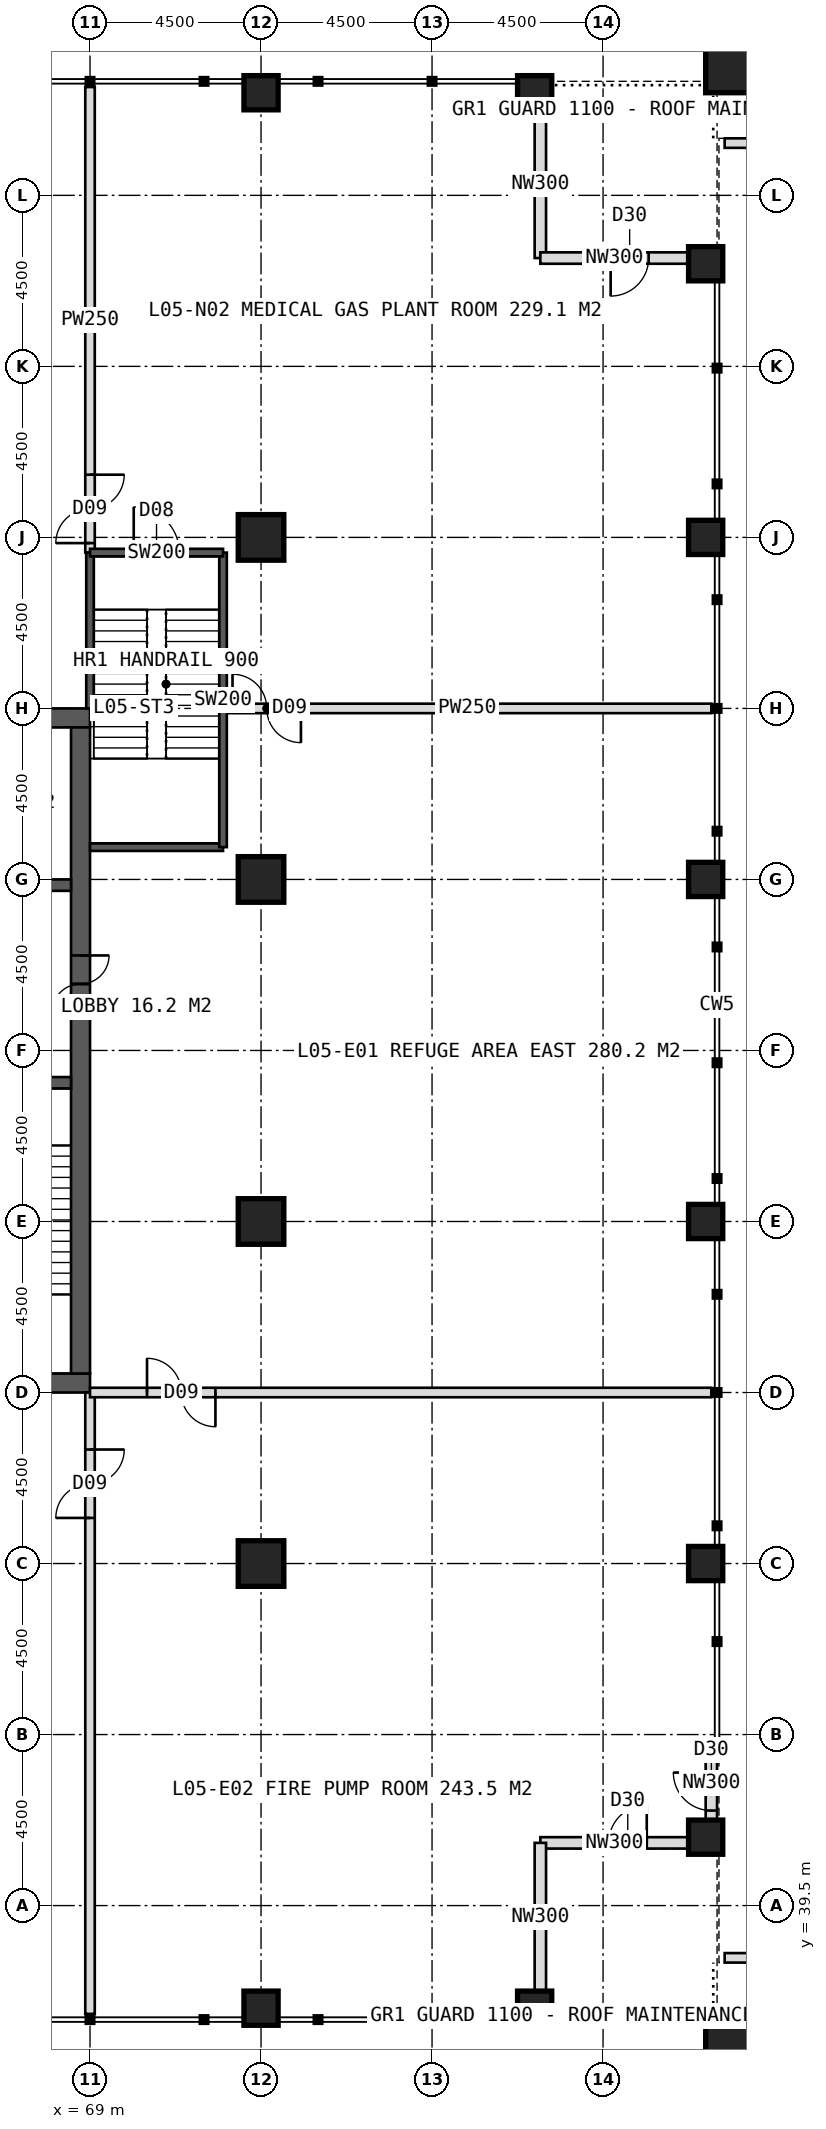
"""IFC4 building model, lengths in metres.
Left out: names, types, materials, properties, quantities, classifications, styles, units other than length and angle.
Written with IfcOpenShell. Run it as: python <this file> out.ifc"""

import sys

from ifc_helpers import new_model, si_unit, direction, frame, frame_2d, origin, origin_2d, place, context, subcontext, project, spatial, rectangle, hollow_rectangle, extrude, element, fill, save


model = new_model("IFC4")
c1 = context("Model", 3, precision=1e-05, world=origin(), true_north=direction((0.0, 1.0)))
c2 = subcontext(c1, "Body", "Model", "MODEL_VIEW")
j1 = project(units=[si_unit("LENGTHUNIT", "METRE"), si_unit("PLANEANGLEUNIT", "RADIAN")], contexts=[c1])
p1 = place(None, origin())
s1 = spatial("IfcSite", under=j1, at=p1, CompositionType="ELEMENT")
p2 = place(p1, origin())
s2 = spatial("IfcBuilding", under=s1, at=p2, CompositionType="ELEMENT")
p3 = place(p2, frame((0.0, 0.0, 26.0)))
s3 = spatial("IfcBuildingStorey", under=s2, at=p3, CompositionType="ELEMENT", Elevation=26.0)
p4 = place(p3, frame((51.0, 70.75, 0.0), z_axis=(0.0, 0.0, 1.0), x_axis=(1.0, 0.0, 0.0)))
e1 = element("IfcWall", 1, at=p4, inside=s3, PredefinedType="SHEAR", context=c2, shape_type="SweptSolid", body=[
    extrude(rectangle(XDim=18.0, YDim=0.5, at=frame_2d((9.0, 0.0))), origin(), (0.0, 0.0, 1.0), 5.0),
])
p5 = place(p4, frame((8.1, 0.0, 0.0)))
e2 = element("IfcOpeningElement", 2, at=p5, cuts=e1, PredefinedType="OPENING", context=c2, shape_type="SweptSolid", body=[
    extrude(rectangle(XDim=1.8, YDim=2.2, at=frame_2d((0.9, 1.1))), frame((0.0, 0.26, 0.0), z_axis=(0.0, -1.0, 0.0), x_axis=(1.0, 0.0, 0.0)), (0.0, 0.0, 1.0), 0.52),
])
p6 = place(p3, frame((51.0, 53.25, 0.0), z_axis=(0.0, 0.0, 1.0), x_axis=(1.0, 0.0, 0.0)))
e3 = element("IfcWall", 3, at=p6, inside=s3, PredefinedType="SHEAR", context=c2, shape_type="SweptSolid", body=[
    extrude(rectangle(XDim=18.0, YDim=0.5, at=frame_2d((9.0, 0.0))), origin(), (0.0, 0.0, 1.0), 5.0),
])
p7 = place(p6, frame((8.1, 0.0, 0.0)))
e4 = element("IfcOpeningElement", 4, at=p7, cuts=e3, PredefinedType="OPENING", context=c2, shape_type="SweptSolid", body=[
    extrude(rectangle(XDim=1.8, YDim=2.2, at=frame_2d((0.9, 1.1))), frame((0.0, 0.26, 0.0), z_axis=(0.0, -1.0, 0.0), x_axis=(1.0, 0.0, 0.0)), (0.0, 0.0, 1.0), 0.52),
])
p8 = place(p3, frame((68.75, 53.5, 0.0), z_axis=(0.0, 0.0, 1.0), x_axis=(0.0, 1.0, 0.0)))
e5 = element("IfcWall", 5, at=p8, inside=s3, PredefinedType="SHEAR", context=c2, shape_type="SweptSolid", body=[
    extrude(rectangle(XDim=17.0, YDim=0.5, at=frame_2d((8.5, 0.0))), origin(), (0.0, 0.0, 1.0), 5.0),
])
p9 = place(p8, frame((9.5, 0.0, 0.0)))
e6 = element("IfcOpeningElement", 6, at=p9, cuts=e5, PredefinedType="OPENING", context=c2, shape_type="SweptSolid", body=[
    extrude(rectangle(XDim=1.5, YDim=2.2, at=frame_2d((0.75, 1.1))), frame((0.0, 0.26, 0.0), z_axis=(0.0, -1.0, 0.0), x_axis=(1.0, 0.0, 0.0)), (0.0, 0.0, 1.0), 0.52),
])
p10 = place(p3, frame((65.2, 61.15, 0.0), z_axis=(0.0, 0.0, 1.0), x_axis=(1.0, 0.0, 0.0)))
e7 = element("IfcWall", 7, at=p10, inside=s3, PredefinedType="SHEAR", context=c2, shape_type="SweptSolid", body=[
    extrude(rectangle(XDim=3.3, YDim=0.3, at=frame_2d((1.65, 0.0))), origin(), (0.0, 0.0, 1.0), 5.0),
])
p11 = place(p10, frame((1.05, 0.0, 0.0)))
e8 = element("IfcOpeningElement", 8, at=p11, cuts=e7, PredefinedType="OPENING", context=c2, shape_type="SweptSolid", body=[
    extrude(rectangle(XDim=1.2, YDim=2.1, at=frame_2d((0.6, 1.05))), frame((0.0, 0.16, 0.0), z_axis=(0.0, -1.0, 0.0), x_axis=(1.0, 0.0, 0.0)), (0.0, 0.0, 1.0), 0.32),
])
p12 = place(p3, frame((65.2, 66.35, 0.0), z_axis=(0.0, 0.0, 1.0), x_axis=(1.0, 0.0, 0.0)))
e9 = element("IfcWall", 9, at=p12, inside=s3, PredefinedType="SHEAR", context=c2, shape_type="SweptSolid", body=[
    extrude(rectangle(XDim=3.3, YDim=0.3, at=frame_2d((1.65, 0.0))), origin(), (0.0, 0.0, 1.0), 5.0),
])
p13 = place(p12, frame((1.05, 0.0, 0.0)))
e10 = element("IfcOpeningElement", 10, at=p13, cuts=e9, PredefinedType="OPENING", context=c2, shape_type="SweptSolid", body=[
    extrude(rectangle(XDim=1.2, YDim=2.2, at=frame_2d((0.6, 1.1))), frame((0.0, 0.16, 0.0), z_axis=(0.0, -1.0, 0.0), x_axis=(1.0, 0.0, 0.0)), (0.0, 0.0, 1.0), 0.32),
])
for number, where, z_axis, x_axis in (
    (11, (73.5, 48.5, 0.0), (0.0, 0.0, 1.0), (1.0, 0.0, 0.0)),
    (12, (73.5, 75.5, 0.0), (0.0, 0.0, 1.0), (1.0, 0.0, 0.0)),
    (13, (73.5, 57.5, 0.0), (0.0, 0.0, 1.0), (1.0, 0.0, 0.0)),
    (14, (73.5, 66.5, 0.0), (0.0, 0.0, 1.0), (1.0, 0.0, 0.0)),
):
    element("IfcColumn", number, at=place(p3, frame(where, z_axis=z_axis, x_axis=x_axis)), inside=s3, PredefinedType="COLUMN", context=c2, shape_type="SweptSolid", body=[
        extrude(hollow_rectangle(XDim=1.2, YDim=1.2, WallThickness=0.1, at=origin_2d()), origin(), (0.0, 0.0, 1.0), 5.0),
    ])
for number, where, z_axis, x_axis in (
    (15, (85.2, 41.3, 0.0), (0.0, 0.0, 1.0), (1.0, 0.0, 0.0)),
    (16, (85.2, 48.5, 0.0), (0.0, 0.0, 1.0), (1.0, 0.0, 0.0)),
    (17, (85.2, 57.5, 0.0), (0.0, 0.0, 1.0), (1.0, 0.0, 0.0)),
    (18, (85.2, 66.5, 0.0), (0.0, 0.0, 1.0), (1.0, 0.0, 0.0)),
    (19, (73.5, 36.8, 0.0), (0.0, 0.0, 1.0), (1.0, 0.0, 0.0)),
    (20, (73.5, 87.2, 0.0), (0.0, 0.0, 1.0), (1.0, 0.0, 0.0)),
    (21, (85.2, 75.5, 0.0), (0.0, 0.0, 1.0), (1.0, 0.0, 0.0)),
    (22, (80.7, 36.8, 0.0), (0.0, 0.0, 1.0), (1.0, 0.0, 0.0)),
    (23, (80.7, 87.2, 0.0), (0.0, 0.0, 1.0), (1.0, 0.0, 0.0)),
    (24, (85.2, 82.7, 0.0), (0.0, 0.0, 1.0), (1.0, 0.0, 0.0)),
):
    element("IfcColumn", number, at=place(p3, frame(where, z_axis=z_axis, x_axis=x_axis)), inside=s3, PredefinedType="COLUMN", context=c2, shape_type="SweptSolid", body=[
        extrude(hollow_rectangle(XDim=0.9, YDim=0.9, WallThickness=0.08, at=origin_2d()), origin(), (0.0, 0.0, 1.0), 5.0),
    ])
for number, where, z_axis, x_axis in (
    (25, (86.1, 35.9, 0.0), (0.0, 0.0, 1.0), (1.0, 0.0, 0.0)),
    (26, (86.1, 88.1, 0.0), (0.0, 0.0, 1.0), (1.0, 0.0, 0.0)),
):
    element("IfcColumn", number, at=place(p3, frame(where, z_axis=z_axis, x_axis=x_axis)), inside=s3, PredefinedType="COLUMN", context=c2, shape_type="SweptSolid", body=[
        extrude(hollow_rectangle(XDim=1.8, YDim=1.8, WallThickness=0.1, at=origin_2d()), origin(), (0.0, 0.0, 1.0), 5.0),
    ])
p14 = place(p3, frame((85.35, 43.7, 0.0), z_axis=(0.0, 0.0, 1.0), x_axis=(0.0, -1.0, 0.0)))
e27 = element("IfcWall", 27, at=p14, inside=s3, PredefinedType="ELEMENTEDWALL", context=c2, shape_type="SweptSolid", body=[
    extrude(rectangle(XDim=1.95, YDim=0.3, at=frame_2d((0.975, 0.0))), origin(), (0.0, 0.0, 1.0), 4.25),
])
p15 = place(p14, frame((0.7, 0.0, 0.0)))
e28 = element("IfcOpeningElement", 28, at=p15, cuts=e27, PredefinedType="OPENING", context=c2, shape_type="SweptSolid", body=[
    extrude(rectangle(XDim=1.0, YDim=2.1, at=frame_2d((0.5, 1.05))), frame((0.0, 0.16, 0.0), z_axis=(0.0, -1.0, 0.0), x_axis=(1.0, 0.0, 0.0)), (0.0, 0.0, 1.0), 0.32),
])
p16 = place(p3, frame((80.85, 86.75, 0.0), z_axis=(0.0, 0.0, 1.0), x_axis=(0.0, -1.0, 0.0)))
e29 = element("IfcWall", 29, at=p16, inside=s3, PredefinedType="ELEMENTEDWALL", context=c2, shape_type="SweptSolid", body=[
    extrude(rectangle(XDim=3.9, YDim=0.3, at=frame_2d((1.95, 0.0))), origin(), (0.0, 0.0, 1.0), 3.95),
])
p17 = place(p3, frame((80.85, 82.85, 0.0), z_axis=(0.0, 0.0, 1.0), x_axis=(1.0, 0.0, 0.0)))
e30 = element("IfcWall", 30, at=p17, inside=s3, PredefinedType="ELEMENTEDWALL", context=c2, shape_type="SweptSolid", body=[
    extrude(rectangle(XDim=3.9, YDim=0.3, at=frame_2d((1.95, 0.0))), origin(), (0.0, 0.0, 1.0), 3.95),
])
p18 = place(p17, frame((1.85, 0.0, 0.0)))
e31 = element("IfcOpeningElement", 31, at=p18, cuts=e30, PredefinedType="OPENING", context=c2, shape_type="SweptSolid", body=[
    extrude(rectangle(XDim=1.0, YDim=2.1, at=frame_2d((0.5, 1.05))), frame((0.0, 0.16, 0.0), z_axis=(0.0, -1.0, 0.0), x_axis=(1.0, 0.0, 0.0)), (0.0, 0.0, 1.0), 0.32),
])
p19 = place(p3, frame((84.75, 41.15, 0.0), z_axis=(0.0, 0.0, 1.0), x_axis=(-1.0, 0.0, 0.0)))
e32 = element("IfcWall", 32, at=p19, inside=s3, PredefinedType="ELEMENTEDWALL", context=c2, shape_type="SweptSolid", body=[
    extrude(rectangle(XDim=3.9, YDim=0.3, at=frame_2d((1.95, 0.0))), origin(), (0.0, 0.0, 1.0), 3.95),
])
p20 = place(p19, frame((1.1, 0.0, 0.0)))
e33 = element("IfcOpeningElement", 33, at=p20, cuts=e32, PredefinedType="OPENING", context=c2, shape_type="SweptSolid", body=[
    extrude(rectangle(XDim=1.0, YDim=2.1, at=frame_2d((0.5, 1.05))), frame((0.0, 0.16, 0.0), z_axis=(0.0, -1.0, 0.0), x_axis=(1.0, 0.0, 0.0)), (0.0, 0.0, 1.0), 0.32),
])
p21 = place(p3, frame((80.85, 41.15, 0.0), z_axis=(0.0, 0.0, 1.0), x_axis=(0.0, -1.0, 0.0)))
e34 = element("IfcWall", 34, at=p21, inside=s3, PredefinedType="ELEMENTEDWALL", context=c2, shape_type="SweptSolid", body=[
    extrude(rectangle(XDim=3.9, YDim=0.3, at=frame_2d((1.95, 0.0))), origin(), (0.0, 0.0, 1.0), 3.95),
])
for number, where, z_axis, x_axis in (
    (35, (85.7, 38.125, 0.0), (0.0, 0.0, 1.0), (1.0, 0.0, 0.0)),
    (36, (85.7, 85.875, 0.0), (0.0, 0.0, 1.0), (1.0, 0.0, 0.0)),
):
    element("IfcWall", number, at=place(p3, frame(where, z_axis=z_axis, x_axis=x_axis)), inside=s3, PredefinedType="PARAPET", context=c2, shape_type="SweptSolid", body=[
        extrude(rectangle(XDim=22.175, YDim=0.25, at=frame_2d((11.087, 0.0))), origin(), (0.0, 0.0, 1.0), 1.1),
    ])
p22 = place(p3, frame((69.0, 75.1, 0.0), z_axis=(0.0, 0.0, 1.0), x_axis=(0.0, 1.0, 0.0)))
e37 = element("IfcWall", 37, at=p22, inside=s3, PredefinedType="SOLIDWALL", context=c2, shape_type="SweptSolid", body=[
    extrude(rectangle(XDim=12.25, YDim=0.25, at=frame_2d((6.125, 0.0))), origin(), (0.0, 0.0, 1.0), 4.75),
])
p23 = place(p22, frame((0.25, 0.0, 0.0)))
e38 = element("IfcOpeningElement", 38, at=p23, cuts=e37, PredefinedType="OPENING", context=c2, shape_type="SweptSolid", body=[
    extrude(rectangle(XDim=1.8, YDim=2.2, at=frame_2d((0.9, 1.1))), frame((0.0, 0.135, 0.0), z_axis=(0.0, -1.0, 0.0), x_axis=(1.0, 0.0, 0.0)), (0.0, 0.0, 1.0), 0.27),
])
p24 = place(p3, frame((69.0, 53.0, 0.0), z_axis=(0.0, 0.0, 1.0), x_axis=(0.0, -1.0, 0.0)))
e39 = element("IfcWall", 39, at=p24, inside=s3, PredefinedType="SOLIDWALL", context=c2, shape_type="SweptSolid", body=[
    extrude(rectangle(XDim=16.35, YDim=0.25, at=frame_2d((8.175, 0.0))), origin(), (0.0, 0.0, 1.0), 4.75),
])
p25 = place(p24, frame((1.5, 0.0, 0.0)))
e40 = element("IfcOpeningElement", 40, at=p25, cuts=e39, PredefinedType="OPENING", context=c2, shape_type="SweptSolid", body=[
    extrude(rectangle(XDim=1.8, YDim=2.2, at=frame_2d((0.9, 1.1))), frame((0.0, 0.135, 0.0), z_axis=(0.0, -1.0, 0.0), x_axis=(1.0, 0.0, 0.0)), (0.0, 0.0, 1.0), 0.27),
])
p26 = place(p3, frame((69.0, 53.0, 0.0), z_axis=(0.0, 0.0, 1.0), x_axis=(1.0, 0.0, 0.0)))
e41 = element("IfcWall", 41, at=p26, inside=s3, PredefinedType="SOLIDWALL", context=c2, shape_type="SweptSolid", body=[
    extrude(rectangle(XDim=16.35, YDim=0.25, at=frame_2d((8.175, 0.0))), origin(), (0.0, 0.0, 1.0), 4.75),
])
p27 = place(p26, frame((1.5, 0.0, 0.0)))
e42 = element("IfcOpeningElement", 42, at=p27, cuts=e41, PredefinedType="OPENING", context=c2, shape_type="SweptSolid", body=[
    extrude(rectangle(XDim=1.8, YDim=2.2, at=frame_2d((0.9, 1.1))), frame((0.0, 0.135, 0.0), z_axis=(0.0, -1.0, 0.0), x_axis=(1.0, 0.0, 0.0)), (0.0, 0.0, 1.0), 0.27),
])
p28 = place(p3, frame((72.5, 71.0, 0.0), z_axis=(0.0, 0.0, 1.0), x_axis=(1.0, 0.0, 0.0)))
e43 = element("IfcWall", 43, at=p28, inside=s3, PredefinedType="SOLIDWALL", context=c2, shape_type="SweptSolid", body=[
    extrude(rectangle(XDim=12.85, YDim=0.25, at=frame_2d((6.425, 0.0))), origin(), (0.0, 0.0, 1.0), 4.75),
])
p29 = place(p28, frame((0.25, 0.0, 0.0)))
e44 = element("IfcOpeningElement", 44, at=p29, cuts=e43, PredefinedType="OPENING", context=c2, shape_type="SweptSolid", body=[
    extrude(rectangle(XDim=1.8, YDim=2.2, at=frame_2d((0.9, 1.1))), frame((0.0, 0.135, 0.0), z_axis=(0.0, -1.0, 0.0), x_axis=(1.0, 0.0, 0.0)), (0.0, 0.0, 1.0), 0.27),
])
p30 = place(p3, frame((69.0, 71.0, 0.0), z_axis=(0.0, 0.0, 1.0), x_axis=(0.0, 1.0, 0.0)))
e45 = element("IfcWall", 45, at=p30, inside=s3, PredefinedType="SOLIDWALL", context=c2, shape_type="SweptSolid", body=[
    extrude(rectangle(XDim=4.1, YDim=0.2, at=frame_2d((2.05, 0.0))), origin(), (0.0, 0.0, 1.0), 4.75),
])
p31 = place(p3, frame((69.0, 67.35, 0.0), z_axis=(0.0, 0.0, 1.0), x_axis=(1.0, 0.0, 0.0)))
e46 = element("IfcWall", 46, at=p31, inside=s3, PredefinedType="SOLIDWALL", context=c2, shape_type="SweptSolid", body=[
    extrude(rectangle(XDim=3.5, YDim=0.2, at=frame_2d((1.75, 0.0))), origin(), (0.0, 0.0, 1.0), 4.75),
])
p32 = place(p3, frame((72.5, 67.35, 0.0), z_axis=(0.0, 0.0, 1.0), x_axis=(0.0, 1.0, 0.0)))
e47 = element("IfcWall", 47, at=p32, inside=s3, PredefinedType="SOLIDWALL", context=c2, shape_type="SweptSolid", body=[
    extrude(rectangle(XDim=7.75, YDim=0.2, at=frame_2d((3.875, 0.0))), origin(), (0.0, 0.0, 1.0), 4.75),
])
p33 = place(p3, frame((69.0, 75.1, 0.0), z_axis=(0.0, 0.0, 1.0), x_axis=(1.0, 0.0, 0.0)))
e48 = element("IfcWall", 48, at=p33, inside=s3, PredefinedType="SOLIDWALL", context=c2, shape_type="SweptSolid", body=[
    extrude(rectangle(XDim=3.5, YDim=0.2, at=frame_2d((1.75, 0.0))), origin(), (0.0, 0.0, 1.0), 4.75),
])
p34 = place(p33, frame((1.15, 0.0, 0.0)))
e49 = element("IfcOpeningElement", 49, at=p34, cuts=e48, PredefinedType="OPENING", context=c2, shape_type="SweptSolid", body=[
    extrude(rectangle(XDim=1.2, YDim=2.1, at=frame_2d((0.6, 1.05))), frame((0.0, 0.11, 0.0), z_axis=(0.0, -1.0, 0.0), x_axis=(1.0, 0.0, 0.0)), (0.0, 0.0, 1.0), 0.22),
])
p35 = place(p23, origin())
e50 = element("IfcDoor", 50, at=p35, inside=s3, OperationType="DOUBLE_DOOR_SINGLE_SWING", PredefinedType="DOOR", context=c2, shape_type="SweptSolid", body=[
    extrude(rectangle(XDim=1.8, YDim=2.2, at=frame_2d((0.9, 1.1))), frame((0.0, 0.025, 0.0), z_axis=(0.0, -1.0, 0.0), x_axis=(1.0, 0.0, 0.0)), (0.0, 0.0, 1.0), 0.05),
])
fill(e38, e50)
p36 = place(p25, origin())
e51 = element("IfcDoor", 51, at=p36, inside=s3, OperationType="DOUBLE_DOOR_SINGLE_SWING", PredefinedType="DOOR", context=c2, shape_type="SweptSolid", body=[
    extrude(rectangle(XDim=1.8, YDim=2.2, at=frame_2d((0.9, 1.1))), frame((0.0, 0.025, 0.0), z_axis=(0.0, -1.0, 0.0), x_axis=(1.0, 0.0, 0.0)), (0.0, 0.0, 1.0), 0.05),
])
fill(e40, e51)
p37 = place(p27, origin())
e52 = element("IfcDoor", 52, at=p37, inside=s3, OperationType="DOUBLE_DOOR_SINGLE_SWING", PredefinedType="DOOR", context=c2, shape_type="SweptSolid", body=[
    extrude(rectangle(XDim=1.8, YDim=2.2, at=frame_2d((0.9, 1.1))), frame((0.0, 0.025, 0.0), z_axis=(0.0, -1.0, 0.0), x_axis=(1.0, 0.0, 0.0)), (0.0, 0.0, 1.0), 0.05),
])
fill(e42, e52)
p38 = place(p29, origin())
e53 = element("IfcDoor", 53, at=p38, inside=s3, OperationType="DOUBLE_DOOR_SINGLE_SWING", PredefinedType="DOOR", context=c2, shape_type="SweptSolid", body=[
    extrude(rectangle(XDim=1.8, YDim=2.2, at=frame_2d((0.9, 1.1))), frame((0.0, 0.025, 0.0), z_axis=(0.0, -1.0, 0.0), x_axis=(1.0, 0.0, 0.0)), (0.0, 0.0, 1.0), 0.05),
])
fill(e44, e53)
p39 = place(p9, origin())
e54 = element("IfcDoor", 54, at=p39, inside=s3, OperationType="DOUBLE_DOOR_SINGLE_SWING", PredefinedType="DOOR", context=c2, shape_type="SweptSolid", body=[
    extrude(rectangle(XDim=1.5, YDim=2.2, at=frame_2d((0.75, 1.1))), frame((0.0, 0.025, 0.0), z_axis=(0.0, -1.0, 0.0), x_axis=(1.0, 0.0, 0.0)), (0.0, 0.0, 1.0), 0.05),
])
fill(e6, e54)
p40 = place(p20, frame((1.0, 0.0, 0.0), z_axis=(0.0, 0.0, 1.0), x_axis=(-1.0, 0.0, 0.0)))
e55 = element("IfcDoor", 55, at=p40, inside=s3, OperationType="SINGLE_SWING_RIGHT", PredefinedType="DOOR", context=c2, shape_type="SweptSolid", body=[
    extrude(rectangle(XDim=1.0, YDim=2.1, at=frame_2d((0.5, 1.05))), frame((0.0, 0.025, 0.0), z_axis=(0.0, -1.0, 0.0), x_axis=(1.0, 0.0, 0.0)), (0.0, 0.0, 1.0), 0.05),
])
fill(e33, e55)
p41 = place(p18, frame((1.0, 0.0, 0.0), z_axis=(0.0, 0.0, 1.0), x_axis=(-1.0, 0.0, 0.0)))
e56 = element("IfcDoor", 56, at=p41, inside=s3, OperationType="SINGLE_SWING_RIGHT", PredefinedType="DOOR", context=c2, shape_type="SweptSolid", body=[
    extrude(rectangle(XDim=1.0, YDim=2.1, at=frame_2d((0.5, 1.05))), frame((0.0, 0.025, 0.0), z_axis=(0.0, -1.0, 0.0), x_axis=(1.0, 0.0, 0.0)), (0.0, 0.0, 1.0), 0.05),
])
fill(e31, e56)
p42 = place(p15, frame((1.0, 0.0, 0.0), z_axis=(0.0, 0.0, 1.0), x_axis=(-1.0, 0.0, 0.0)))
e57 = element("IfcDoor", 57, at=p42, inside=s3, OperationType="SINGLE_SWING_RIGHT", PredefinedType="DOOR", context=c2, shape_type="SweptSolid", body=[
    extrude(rectangle(XDim=1.0, YDim=2.1, at=frame_2d((0.5, 1.05))), frame((0.0, 0.025, 0.0), z_axis=(0.0, -1.0, 0.0), x_axis=(1.0, 0.0, 0.0)), (0.0, 0.0, 1.0), 0.05),
])
fill(e28, e57)
p43 = place(p34, origin())
e58 = element("IfcDoor", 58, at=p43, inside=s3, OperationType="SINGLE_SWING_LEFT", PredefinedType="DOOR", context=c2, shape_type="SweptSolid", body=[
    extrude(rectangle(XDim=1.2, YDim=2.1, at=frame_2d((0.6, 1.05))), frame((0.0, 0.025, 0.0), z_axis=(0.0, -1.0, 0.0), x_axis=(1.0, 0.0, 0.0)), (0.0, 0.0, 1.0), 0.05),
])
fill(e49, e58)
save(model, sys.argv[1])
